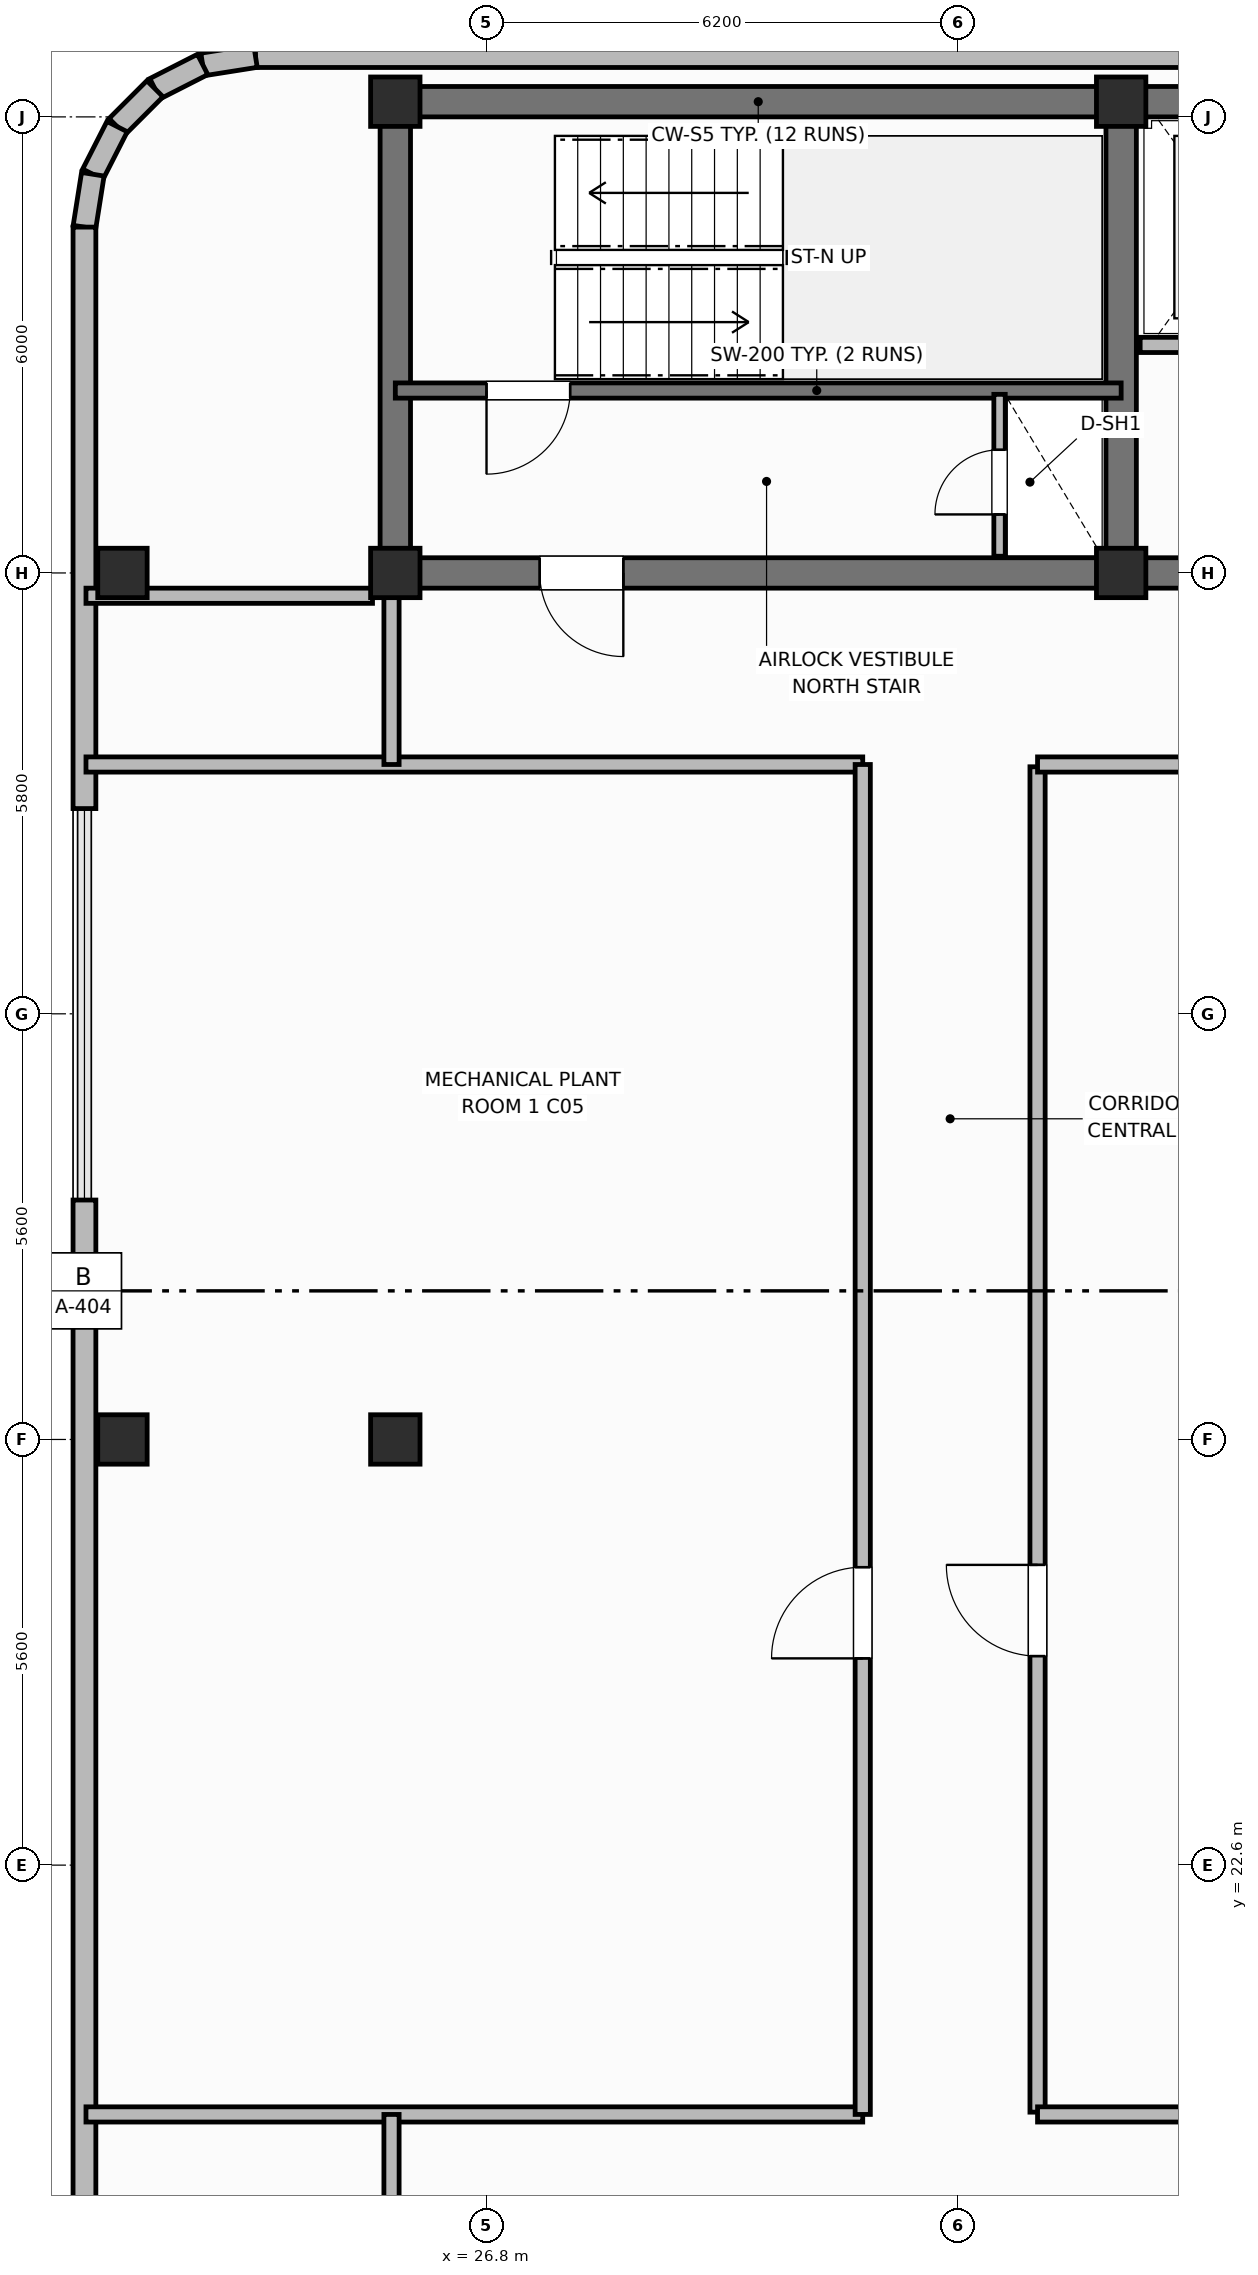
"""IFC4 building model, lengths in metres.
Left out: names, types, materials, properties, quantities, classifications, styles, units other than length and angle.
Written with IfcOpenShell. Run it as: python <this file> out.ifc"""

import sys

from ifc_helpers import new_model, si_unit, direction, frame, frame_2d, origin, origin_2d, place, context, subcontext, project, spatial, rectangle, extrude, element, fill, save


model = new_model("IFC4")
c1 = context("Model", 3, precision=1e-05, world=origin(), true_north=direction((0.0, 1.0)))
c2 = subcontext(c1, "Body", "Model", "MODEL_VIEW")
j1 = project(units=[si_unit("LENGTHUNIT", "METRE"), si_unit("PLANEANGLEUNIT", "RADIAN")], contexts=[c1])
p1 = place(None, origin())
s1 = spatial("IfcSite", under=j1, at=p1, CompositionType="ELEMENT")
p2 = place(p1, origin())
s2 = spatial("IfcBuilding", under=s1, at=p2, CompositionType="ELEMENT")
p3 = place(p2, frame((0.0, 0.0, 316.4)))
s3 = spatial("IfcBuildingStorey", under=s2, at=p3, CompositionType="ELEMENT", Elevation=316.4)
p4 = place(p3, frame((25.6, 45.8, 0.0), z_axis=(0.0, 0.0, 1.0), x_axis=(1.0, 0.0, 0.0)))
e1 = element("IfcWall", 1, at=p4, inside=s3, PredefinedType="SHEAR", context=c2, shape_type="SweptSolid", body=[
    extrude(rectangle(XDim=27.2, YDim=0.4, at=frame_2d((13.6, 0.0))), origin(), (0.0, 0.0, 1.0), 3.6),
])
p5 = place(p3, frame((25.6, 39.8, 0.0), z_axis=(0.0, 0.0, 1.0), x_axis=(0.0, 1.0, 0.0)))
e2 = element("IfcWall", 2, at=p5, inside=s3, PredefinedType="SHEAR", context=c2, shape_type="SweptSolid", body=[
    extrude(rectangle(XDim=5.8, YDim=0.4, at=frame_2d((2.9, 0.0))), origin(), (0.0, 0.0, 1.0), 3.6),
])
p6 = place(p3, frame((52.8, 39.6, 0.0), z_axis=(0.0, 0.0, 1.0), x_axis=(-1.0, 0.0, 0.0)))
e3 = element("IfcWall", 3, at=p6, inside=s3, PredefinedType="SHEAR", context=c2, shape_type="SweptSolid", body=[
    extrude(rectangle(XDim=27.2, YDim=0.4, at=frame_2d((13.6, 0.0))), origin(), (0.0, 0.0, 1.0), 3.6),
])
p7 = place(p6, frame((24.2, 0.0, 0.0)))
e4 = element("IfcOpeningElement", 4, at=p7, cuts=e3, PredefinedType="OPENING", context=c2, shape_type="SweptSolid", body=[
    extrude(rectangle(XDim=1.1, YDim=2.15, at=frame_2d((0.55, 1.075))), frame((0.0, 0.21, 0.0), z_axis=(0.0, -1.0, 0.0), x_axis=(1.0, 0.0, 0.0)), (0.0, 0.0, 1.0), 0.42),
])
p8 = place(p6, frame((15.1, 0.0, 0.0)))
e5 = element("IfcOpeningElement", 5, at=p8, cuts=e3, PredefinedType="OPENING", context=c2, shape_type="SweptSolid", body=[
    extrude(rectangle(XDim=1.2, YDim=2.15, at=frame_2d((0.6, 1.075))), frame((0.0, 0.21, 0.0), z_axis=(0.0, -1.0, 0.0), x_axis=(1.0, 0.0, 0.0)), (0.0, 0.0, 1.0), 0.42),
])
p9 = place(p6, frame((11.6, 0.0, 0.0)))
e6 = element("IfcOpeningElement", 6, at=p9, cuts=e3, PredefinedType="OPENING", context=c2, shape_type="SweptSolid", body=[
    extrude(rectangle(XDim=0.9, YDim=2.1, at=frame_2d((0.45, 1.05))), frame((0.0, 0.21, 0.0), z_axis=(0.0, -1.0, 0.0), x_axis=(1.0, 0.0, 0.0)), (0.0, 0.0, 1.0), 0.42),
])
p10 = place(p6, frame((4.2, 0.0, 0.0)))
e7 = element("IfcOpeningElement", 7, at=p10, cuts=e3, PredefinedType="OPENING", context=c2, shape_type="SweptSolid", body=[
    extrude(rectangle(XDim=1.3, YDim=2.2, at=frame_2d((0.65, 1.1))), frame((0.0, 0.21, 0.0), z_axis=(0.0, -1.0, 0.0), x_axis=(1.0, 0.0, 0.0)), (0.0, 0.0, 1.0), 0.42),
])
p11 = place(p3, frame((35.15, 39.8, 0.0), z_axis=(0.0, 0.0, 1.0), x_axis=(0.0, 1.0, 0.0)))
e8 = element("IfcWall", 8, at=p11, inside=s3, PredefinedType="SHEAR", context=c2, shape_type="SweptSolid", body=[
    extrude(rectangle(XDim=5.8, YDim=0.4, at=frame_2d((2.9, 0.0))), origin(), (0.0, 0.0, 1.0), 3.6),
])
for number, where, z_axis, x_axis in (
    (9, (25.6, 39.6, 0.0), (0.0, 0.0, 1.0), (1.0, 0.0, 0.0)),
    (10, (25.6, 45.8, 0.0), (0.0, 0.0, 1.0), (1.0, 0.0, 0.0)),
    (11, (35.15, 39.6, 0.0), (0.0, 0.0, 1.0), (1.0, 0.0, 0.0)),
    (12, (35.15, 45.8, 0.0), (0.0, 0.0, 1.0), (1.0, 0.0, 0.0)),
    (13, (25.6, 28.2, 0.0), (0.0, 0.0, 1.0), (1.0, 0.0, 0.0)),
    (14, (22.01, 28.2, 0.0), (0.0, 0.0, 1.0), (1.0, 0.0, 0.0)),
    (15, (22.01, 39.6, 0.0), (0.0, 0.0, 1.0), (1.0, 0.0, 0.0)),
):
    element("IfcColumn", number, at=place(p3, frame(where, z_axis=z_axis, x_axis=x_axis)), inside=s3, PredefinedType="COLUMN", context=c2, shape_type="SweptSolid", body=[
        extrude(rectangle(XDim=0.65, YDim=0.65, at=origin_2d()), origin(), (0.0, 0.0, 1.0), 3.6),
    ])
p12 = place(p3, frame((54.64, 46.4, 0.0), z_axis=(0.0, 0.0, 1.0), x_axis=(-1.0, 0.0, 0.0)))
e16 = element("IfcWall", 16, at=p12, inside=s3, PredefinedType="SOLIDWALL", context=c2, shape_type="SweptSolid", body=[
    extrude(rectangle(XDim=30.88, YDim=0.3, at=frame_2d((15.44, 0.0))), origin(), (0.0, 0.0, 1.0), 2.84),
])
for number, where, z_axis, x_axis in (
    (17, (23.76, 46.4, 0.0), (0.0, 0.0, 1.0), (-0.988, -0.156, 0.0)),
    (18, (23.065, 46.29, 0.0), (0.0, 0.0, 1.0), (-0.891, -0.454, 0.0)),
):
    element("IfcWall", number, at=place(p3, frame(where, z_axis=z_axis, x_axis=x_axis)), inside=s3, PredefinedType="SOLIDWALL", context=c2, shape_type="SweptSolid", body=[
        extrude(rectangle(XDim=0.704, YDim=0.3, at=frame_2d((0.352, 0.0))), origin(), (0.0, 0.0, 1.0), 2.84),
    ])
p13 = place(p3, frame((22.438, 45.97, 0.0), z_axis=(0.0, 0.0, 1.0), x_axis=(-0.707106781187, -0.707106781187, 0.0)))
e19 = element("IfcWall", 19, at=p13, inside=s3, PredefinedType="SOLIDWALL", context=c2, shape_type="SweptSolid", body=[
    extrude(rectangle(XDim=0.704, YDim=0.3, at=frame_2d((0.352, 0.0))), origin(), (0.0, 0.0, 1.0), 2.84),
])
for number, where, z_axis, x_axis in (
    (20, (21.94, 45.472, 0.0), (0.0, 0.0, 1.0), (-0.454, -0.891, 0.0)),
    (21, (21.62, 44.845, 0.0), (0.0, 0.0, 1.0), (-0.156, -0.988, 0.0)),
):
    element("IfcWall", number, at=place(p3, frame(where, z_axis=z_axis, x_axis=x_axis)), inside=s3, PredefinedType="SOLIDWALL", context=c2, shape_type="SweptSolid", body=[
        extrude(rectangle(XDim=0.704, YDim=0.3, at=frame_2d((0.352, 0.0))), origin(), (0.0, 0.0, 1.0), 2.84),
    ])
p14 = place(p3, frame((21.51, 44.15, 0.0), z_axis=(0.0, 0.0, 1.0), x_axis=(0.0, -1.0, 0.0)))
e22 = element("IfcWall", 22, at=p14, inside=s3, PredefinedType="SOLIDWALL", context=c2, shape_type="SweptSolid", body=[
    extrude(rectangle(XDim=7.65, YDim=0.3, at=frame_2d((3.825, 0.0))), origin(), (0.0, 0.0, 1.0), 2.84),
])
p15 = place(p3, frame((21.51, 31.35, 0.0), z_axis=(0.0, 0.0, 1.0), x_axis=(0.0, -1.0, 0.0)))
e23 = element("IfcWall", 23, at=p15, inside=s3, PredefinedType="SOLIDWALL", context=c2, shape_type="SweptSolid", body=[
    extrude(rectangle(XDim=19.1, YDim=0.3, at=frame_2d((9.55, 0.0))), origin(), (0.0, 0.0, 1.0), 2.84),
])
p16 = place(p3, frame((35.15, 42.0, 0.0), z_axis=(0.0, 0.0, 1.0), x_axis=(-1.0, 0.0, 0.0)))
e24 = element("IfcWall", 24, at=p16, inside=s3, PredefinedType="SHEAR", context=c2, shape_type="SweptSolid", body=[
    extrude(rectangle(XDim=9.55, YDim=0.2, at=frame_2d((4.775, 0.0))), origin(), (0.0, 0.0, 1.0), 3.6),
])
p17 = place(p16, frame((7.25, 0.0, 0.0)))
e25 = element("IfcOpeningElement", 25, at=p17, cuts=e24, PredefinedType="OPENING", context=c2, shape_type="SweptSolid", body=[
    extrude(rectangle(XDim=1.1, YDim=2.15, at=frame_2d((0.55, 1.075))), frame((0.0, 0.11, 0.0), z_axis=(0.0, -1.0, 0.0), x_axis=(1.0, 0.0, 0.0)), (0.0, 0.0, 1.0), 0.22),
])
p18 = place(p3, frame((33.55, 39.82, 0.0), z_axis=(0.0, 0.0, 1.0), x_axis=(0.0, 1.0, 0.0)))
e26 = element("IfcWall", 26, at=p18, inside=s3, PredefinedType="PARTITIONING", context=c2, shape_type="SweptSolid", body=[
    extrude(rectangle(XDim=2.13, YDim=0.15, at=frame_2d((1.065, 0.0))), origin(), (0.0, 0.0, 1.0), 2.54),
])
p19 = place(p18, frame((0.55, 0.0, 0.0)))
e27 = element("IfcOpeningElement", 27, at=p19, cuts=e26, PredefinedType="OPENING", context=c2, shape_type="SweptSolid", body=[
    extrude(rectangle(XDim=0.85, YDim=2.05, at=frame_2d((0.425, 1.025))), frame((0.0, 0.085, 0.0), z_axis=(0.0, -1.0, 0.0), x_axis=(1.0, 0.0, 0.0)), (0.0, 0.0, 1.0), 0.17),
])
p20 = place(p3, frame((37.95, 42.6, 0.0), z_axis=(0.0, 0.0, 1.0), x_axis=(-1.0, 0.0, 0.0)))
e28 = element("IfcWall", 28, at=p20, inside=s3, PredefinedType="PARTITIONING", context=c2, shape_type="SweptSolid", body=[
    extrude(rectangle(XDim=2.55, YDim=0.2, at=frame_2d((1.275, 0.0))), origin(), (0.0, 0.0, 1.0), 2.2),
])
p21 = place(p20, frame((0.75, 0.0, 0.0)))
e29 = element("IfcOpeningElement", 29, at=p21, cuts=e28, PredefinedType="OPENING", context=c2, shape_type="SweptSolid", body=[
    extrude(rectangle(XDim=1.1, YDim=2.15, at=frame_2d((0.55, 1.075))), frame((0.0, 0.11, 0.0), z_axis=(0.0, -1.0, 0.0), x_axis=(1.0, 0.0, 0.0)), (0.0, 0.0, 1.0), 0.22),
])
for number, where, z_axis, x_axis in (
    (30, (21.53, 19.32, 0.0), (0.0, 0.0, 1.0), (1.0, 0.0, 0.0)),
    (31, (21.53, 37.08, 0.0), (0.0, 0.0, 1.0), (1.0, 0.0, 0.0)),
):
    element("IfcWall", number, at=place(p3, frame(where, z_axis=z_axis, x_axis=x_axis)), inside=s3, PredefinedType="PARTITIONING", context=c2, shape_type="SweptSolid", body=[
        extrude(rectangle(XDim=10.22, YDim=0.2, at=frame_2d((5.11, 0.0))), origin(), (0.0, 0.0, 1.0), 2.54),
    ])
p22 = place(p3, frame((31.75, 19.32, 0.0), z_axis=(0.0, 0.0, 1.0), x_axis=(0.0, 1.0, 0.0)))
e32 = element("IfcWall", 32, at=p22, inside=s3, PredefinedType="PARTITIONING", context=c2, shape_type="SweptSolid", body=[
    extrude(rectangle(XDim=17.76, YDim=0.2, at=frame_2d((8.88, 0.0))), origin(), (0.0, 0.0, 1.0), 2.54),
])
p23 = place(p22, frame((6.0, 0.0, 0.0)))
e33 = element("IfcOpeningElement", 33, at=p23, cuts=e32, PredefinedType="OPENING", context=c2, shape_type="SweptSolid", body=[
    extrude(rectangle(XDim=1.2, YDim=2.15, at=frame_2d((0.6, 1.075))), frame((0.0, 0.11, 0.0), z_axis=(0.0, -1.0, 0.0), x_axis=(1.0, 0.0, 0.0)), (0.0, 0.0, 1.0), 0.22),
])
p24 = place(p3, frame((34.05, 19.35, 0.0), z_axis=(0.0, 0.0, 1.0), x_axis=(0.0, 1.0, 0.0)))
e34 = element("IfcWall", 34, at=p24, inside=s3, PredefinedType="PARTITIONING", context=c2, shape_type="SweptSolid", body=[
    extrude(rectangle(XDim=17.7, YDim=0.2, at=frame_2d((8.85, 0.0))), origin(), (0.0, 0.0, 1.0), 2.54),
])
p25 = place(p24, frame((6.0, 0.0, 0.0)))
e35 = element("IfcOpeningElement", 35, at=p25, cuts=e34, PredefinedType="OPENING", context=c2, shape_type="SweptSolid", body=[
    extrude(rectangle(XDim=1.2, YDim=2.15, at=frame_2d((0.6, 1.075))), frame((0.0, 0.11, 0.0), z_axis=(0.0, -1.0, 0.0), x_axis=(1.0, 0.0, 0.0)), (0.0, 0.0, 1.0), 0.22),
])
p26 = place(p3, frame((34.05, 19.32, 0.0), z_axis=(0.0, 0.0, 1.0), x_axis=(1.0, 0.0, 0.0)))
e36 = element("IfcWall", 36, at=p26, inside=s3, PredefinedType="PARTITIONING", context=c2, shape_type="SweptSolid", body=[
    extrude(rectangle(XDim=22.82, YDim=0.2, at=frame_2d((11.41, 0.0))), origin(), (0.0, 0.0, 1.0), 2.54),
])
p27 = place(p26, frame((14.75, 0.0, 0.0)))
e37 = element("IfcOpeningElement", 37, at=p27, cuts=e36, PredefinedType="OPENING", context=c2, shape_type="SweptSolid", body=[
    extrude(rectangle(XDim=1.2, YDim=2.15, at=frame_2d((0.6, 1.075))), frame((0.0, 0.11, 0.0), z_axis=(0.0, -1.0, 0.0), x_axis=(1.0, 0.0, 0.0)), (0.0, 0.0, 1.0), 0.22),
])
p28 = place(p3, frame((56.87, 37.08, 0.0), z_axis=(0.0, 0.0, 1.0), x_axis=(-1.0, 0.0, 0.0)))
e38 = element("IfcWall", 38, at=p28, inside=s3, PredefinedType="PARTITIONING", context=c2, shape_type="SweptSolid", body=[
    extrude(rectangle(XDim=22.82, YDim=0.2, at=frame_2d((11.41, 0.0))), origin(), (0.0, 0.0, 1.0), 2.54),
])
p29 = place(p28, frame((6.87, 0.0, 0.0)))
e39 = element("IfcOpeningElement", 39, at=p29, cuts=e38, PredefinedType="OPENING", context=c2, shape_type="SweptSolid", body=[
    extrude(rectangle(XDim=1.2, YDim=2.15, at=frame_2d((0.6, 1.075))), frame((0.0, 0.11, 0.0), z_axis=(0.0, -1.0, 0.0), x_axis=(1.0, 0.0, 0.0)), (0.0, 0.0, 1.0), 0.22),
])
p30 = place(p3, frame((25.55, 16.95, 0.0), z_axis=(0.0, 0.0, 1.0), x_axis=(0.0, 1.0, 0.0)))
e40 = element("IfcWall", 40, at=p30, inside=s3, PredefinedType="PARTITIONING", context=c2, shape_type="SweptSolid", body=[
    extrude(rectangle(XDim=2.37, YDim=0.2, at=frame_2d((1.185, 0.0))), origin(), (0.0, 0.0, 1.0), 2.54),
])
p31 = place(p3, frame((25.55, 37.08, 0.0), z_axis=(0.0, 0.0, 1.0), x_axis=(0.0, 1.0, 0.0)))
e41 = element("IfcWall", 41, at=p31, inside=s3, PredefinedType="PARTITIONING", context=c2, shape_type="SweptSolid", body=[
    extrude(rectangle(XDim=2.37, YDim=0.2, at=frame_2d((1.185, 0.0))), origin(), (0.0, 0.0, 1.0), 2.54),
])
p32 = place(p3, frame((21.53, 39.3, 0.0), z_axis=(0.0, 0.0, 1.0), x_axis=(1.0, 0.0, 0.0)))
e42 = element("IfcWall", 42, at=p32, inside=s3, PredefinedType="PARTITIONING", context=c2, shape_type="SweptSolid", body=[
    extrude(rectangle(XDim=3.77, YDim=0.2, at=frame_2d((1.885, 0.0))), origin(), (0.0, 0.0, 1.0), 2.54),
])
p33 = place(p17, origin())
e43 = element("IfcDoor", 43, at=p33, inside=s3, OperationType="SINGLE_SWING_RIGHT", PredefinedType="DOOR", context=c2, shape_type="SweptSolid", body=[
    extrude(rectangle(XDim=1.1, YDim=2.15, at=frame_2d((0.55, 1.075))), frame((0.0, 0.025, 0.0), z_axis=(0.0, -1.0, 0.0), x_axis=(1.0, 0.0, 0.0)), (0.0, 0.0, 1.0), 0.05),
])
fill(e25, e43)
p34 = place(p19, origin())
e44 = element("IfcDoor", 44, at=p34, inside=s3, OperationType="SINGLE_SWING_LEFT", PredefinedType="TRAPDOOR", context=c2, shape_type="SweptSolid", body=[
    extrude(rectangle(XDim=0.85, YDim=2.05, at=frame_2d((0.425, 1.025))), frame((0.0, 0.025, 0.0), z_axis=(0.0, -1.0, 0.0), x_axis=(1.0, 0.0, 0.0)), (0.0, 0.0, 1.0), 0.05),
])
fill(e27, e44)
p35 = place(p23, origin())
e45 = element("IfcDoor", 45, at=p35, inside=s3, OperationType="SINGLE_SWING_LEFT", PredefinedType="DOOR", context=c2, shape_type="SweptSolid", body=[
    extrude(rectangle(XDim=1.2, YDim=2.15, at=frame_2d((0.6, 1.075))), frame((0.0, 0.025, 0.0), z_axis=(0.0, -1.0, 0.0), x_axis=(1.0, 0.0, 0.0)), (0.0, 0.0, 1.0), 0.05),
])
fill(e33, e45)
p36 = place(p25, origin())
e46 = element("IfcDoor", 46, at=p36, inside=s3, OperationType="SINGLE_SWING_RIGHT", PredefinedType="DOOR", context=c2, shape_type="SweptSolid", body=[
    extrude(rectangle(XDim=1.2, YDim=2.15, at=frame_2d((0.6, 1.075))), frame((0.0, 0.025, 0.0), z_axis=(0.0, -1.0, 0.0), x_axis=(1.0, 0.0, 0.0)), (0.0, 0.0, 1.0), 0.05),
])
fill(e35, e46)
p37 = place(p7, origin())
e47 = element("IfcDoor", 47, at=p37, inside=s3, OperationType="SINGLE_SWING_LEFT", PredefinedType="DOOR", context=c2, shape_type="SweptSolid", body=[
    extrude(rectangle(XDim=1.1, YDim=2.15, at=frame_2d((0.55, 1.075))), frame((0.0, 0.025, 0.0), z_axis=(0.0, -1.0, 0.0), x_axis=(1.0, 0.0, 0.0)), (0.0, 0.0, 1.0), 0.05),
])
fill(e4, e47)
save(model, sys.argv[1])
